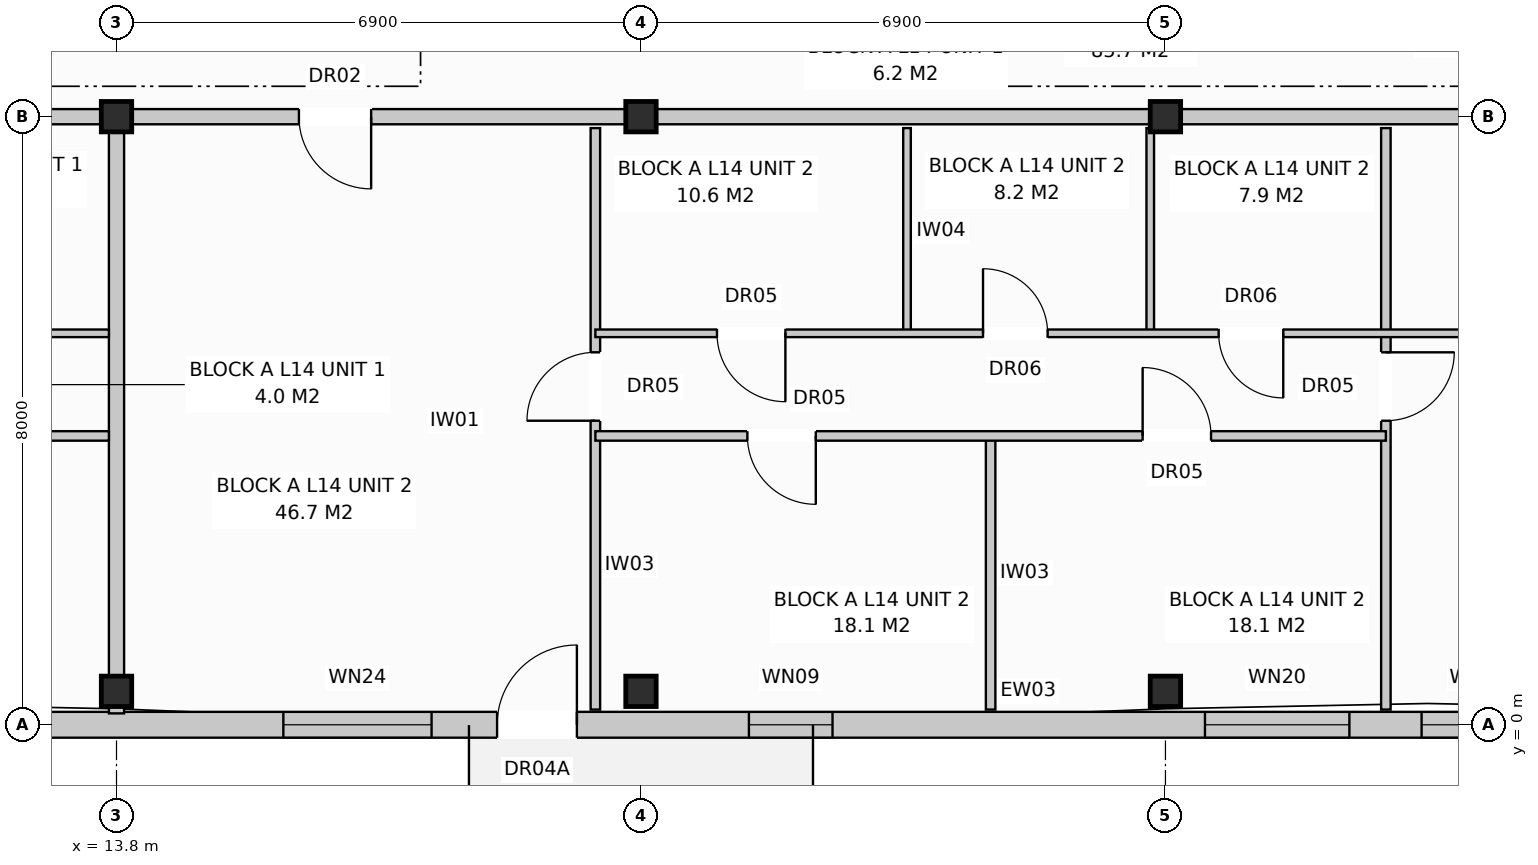
"""IFC4 building model, lengths in metres.
Left out: names, types, materials, properties, quantities, classifications, styles, units other than length and angle.
Written with IfcOpenShell. Run it as: python <this file> out.ifc"""

import sys

from ifc_helpers import new_model, si_unit, direction, frame, frame_2d, origin, origin_with_axes, origin_2d, place, context, subcontext, project, spatial, rectangle, extrude, element, fill, save


model = new_model("IFC4")
c1 = context("Model", 3, precision=1e-05, world=origin(), true_north=direction((0.0, 1.0)))
c2 = subcontext(c1, "Body", "Model", "MODEL_VIEW")
j1 = project(units=[si_unit("LENGTHUNIT", "METRE"), si_unit("PLANEANGLEUNIT", "RADIAN")], contexts=[c1])
p1 = place(None, origin())
s1 = spatial("IfcSite", under=j1, at=p1, CompositionType="ELEMENT")
p2 = place(p1, origin())
s2 = spatial("IfcBuilding", under=s1, at=p2, CompositionType="ELEMENT")
p3 = place(p2, frame((0.0, 0.0, 46.4)))
s3 = spatial("IfcBuildingStorey", under=s2, at=p3, CompositionType="ELEMENT", Elevation=46.4)
for number, where, z_axis, x_axis in (
    (1, (13.8, 0.44, 0.0), (0.0, 0.0, 1.0), (1.0, 0.0, 0.0)),
    (2, (13.8, 8.0, 0.0), (0.0, 0.0, 1.0), (1.0, 0.0, 0.0)),
    (3, (20.7, 0.44, 0.0), (0.0, 0.0, 1.0), (1.0, 0.0, 0.0)),
    (4, (20.7, 8.0, 0.0), (0.0, 0.0, 1.0), (1.0, 0.0, 0.0)),
    (5, (27.6, 0.44, 0.0), (0.0, 0.0, 1.0), (1.0, 0.0, 0.0)),
    (6, (27.6, 8.0, 0.0), (0.0, 0.0, 1.0), (1.0, 0.0, 0.0)),
):
    element("IfcColumn", number, at=place(p3, frame(where, z_axis=z_axis, x_axis=x_axis)), inside=s3, PredefinedType="COLUMN", context=c2, shape_type="SweptSolid", body=[
        extrude(rectangle(XDim=0.4, YDim=0.4, at=origin_2d()), origin(), (0.0, 0.0, 1.0), 3.2),
    ])
p4 = place(p3, frame((0.16, 0.0, 0.0), z_axis=(0.0, 0.0, 1.0), x_axis=(1.0, 0.0, 0.0)))
e7 = element("IfcWall", 7, at=p4, inside=s3, PredefinedType="STANDARD", context=c2, shape_type="SweptSolid", body=[
    extrude(rectangle(XDim=41.08, YDim=0.34, at=frame_2d((20.54, 0.0))), origin(), (0.0, 0.0, 1.0), 2.91),
])
p5 = place(p4, frame((7.36, 0.0, 0.0)))
e8 = element("IfcOpeningElement", 8, at=p5, cuts=e7, PredefinedType="OPENING", context=c2, shape_type="SweptSolid", body=[
    extrude(rectangle(XDim=1.05, YDim=2.12, at=frame_2d((0.525, 1.06))), frame((0.0, 0.182, 0.0), z_axis=(0.0, -1.0, 0.0), x_axis=(1.0, 0.0, 0.0)), (0.0, 0.0, 1.0), 0.364),
])
p6 = place(p4, frame((18.647, 0.0, 0.0)))
e9 = element("IfcOpeningElement", 9, at=p6, cuts=e7, PredefinedType="OPENING", context=c2, shape_type="SweptSolid", body=[
    extrude(rectangle(XDim=1.05, YDim=2.12, at=frame_2d((0.525, 1.06))), frame((0.0, 0.182, 0.0), z_axis=(0.0, -1.0, 0.0), x_axis=(1.0, 0.0, 0.0)), (0.0, 0.0, 1.0), 0.364),
])
p7 = place(p4, frame((32.647, 0.0, 0.0)))
e10 = element("IfcOpeningElement", 10, at=p7, cuts=e7, PredefinedType="OPENING", context=c2, shape_type="SweptSolid", body=[
    extrude(rectangle(XDim=1.05, YDim=2.12, at=frame_2d((0.525, 1.06))), frame((0.0, 0.182, 0.0), z_axis=(0.0, -1.0, 0.0), x_axis=(1.0, 0.0, 0.0)), (0.0, 0.0, 1.0), 0.364),
])
p8 = place(p4, frame((1.61, 0.0, 0.8)))
e11 = element("IfcOpeningElement", 11, at=p8, cuts=e7, PredefinedType="OPENING", context=c2, shape_type="SweptSolid", body=[
    extrude(rectangle(XDim=1.8, YDim=1.7, at=frame_2d((0.9, 0.85))), frame((0.0, 0.182, 0.0), z_axis=(0.0, -1.0, 0.0), x_axis=(1.0, 0.0, 0.0)), (0.0, 0.0, 1.0), 0.364),
])
p9 = place(p4, frame((10.46, 0.0, 0.8)))
e12 = element("IfcOpeningElement", 12, at=p9, cuts=e7, PredefinedType="OPENING", context=c2, shape_type="SweptSolid", body=[
    extrude(rectangle(XDim=1.9, YDim=1.85, at=frame_2d((0.95, 0.925))), frame((0.0, 0.182, 0.0), z_axis=(0.0, -1.0, 0.0), x_axis=(1.0, 0.0, 0.0)), (0.0, 0.0, 1.0), 0.364),
])
p10 = place(p4, frame((15.835, 0.0, 0.8)))
e13 = element("IfcOpeningElement", 13, at=p10, cuts=e7, PredefinedType="OPENING", context=c2, shape_type="SweptSolid", body=[
    extrude(rectangle(XDim=1.95, YDim=1.65, at=frame_2d((0.975, 0.825))), frame((0.0, 0.182, 0.0), z_axis=(0.0, -1.0, 0.0), x_axis=(1.0, 0.0, 0.0)), (0.0, 0.0, 1.0), 0.364),
])
p11 = place(p4, frame((21.96, 0.0, 0.72)))
e14 = element("IfcOpeningElement", 14, at=p11, cuts=e7, PredefinedType="OPENING", context=c2, shape_type="SweptSolid", body=[
    extrude(rectangle(XDim=1.1, YDim=1.5, at=frame_2d((0.55, 0.75))), frame((0.0, 0.182, 0.0), z_axis=(0.0, -1.0, 0.0), x_axis=(1.0, 0.0, 0.0)), (0.0, 0.0, 1.0), 0.364),
])
p12 = place(p4, frame((27.96, 0.0, 0.8)))
e15 = element("IfcOpeningElement", 15, at=p12, cuts=e7, PredefinedType="OPENING", context=c2, shape_type="SweptSolid", body=[
    extrude(rectangle(XDim=1.9, YDim=1.85, at=frame_2d((0.95, 0.925))), frame((0.0, 0.182, 0.0), z_axis=(0.0, -1.0, 0.0), x_axis=(1.0, 0.0, 0.0)), (0.0, 0.0, 1.0), 0.364),
])
p13 = place(p4, frame((30.81, 0.0, 0.85)))
e16 = element("IfcOpeningElement", 16, at=p13, cuts=e7, PredefinedType="OPENING", context=c2, shape_type="SweptSolid", body=[
    extrude(rectangle(XDim=1.5, YDim=1.65, at=frame_2d((0.75, 0.825))), frame((0.0, 0.182, 0.0), z_axis=(0.0, -1.0, 0.0), x_axis=(1.0, 0.0, 0.0)), (0.0, 0.0, 1.0), 0.364),
])
p14 = place(p4, frame((35.76, 0.0, 0.72)))
e17 = element("IfcOpeningElement", 17, at=p14, cuts=e7, PredefinedType="OPENING", context=c2, shape_type="SweptSolid", body=[
    extrude(rectangle(XDim=1.1, YDim=1.5, at=frame_2d((0.55, 0.75))), frame((0.0, 0.182, 0.0), z_axis=(0.0, -1.0, 0.0), x_axis=(1.0, 0.0, 0.0)), (0.0, 0.0, 1.0), 0.364),
])
p15 = place(p4, frame((38.575, 0.0, 0.8)))
e18 = element("IfcOpeningElement", 18, at=p15, cuts=e7, PredefinedType="OPENING", context=c2, shape_type="SweptSolid", body=[
    extrude(rectangle(XDim=1.9, YDim=1.85, at=frame_2d((0.95, 0.925))), frame((0.0, 0.182, 0.0), z_axis=(0.0, -1.0, 0.0), x_axis=(1.0, 0.0, 0.0)), (0.0, 0.0, 1.0), 0.364),
])
p16 = place(p3, frame((13.8, 7.85, 0.0), z_axis=(0.0, 0.0, 1.0), x_axis=(0.0, -1.0, 0.0)))
e19 = element("IfcWall", 19, at=p16, inside=s3, PredefinedType="PARTITIONING", context=c2, shape_type="SweptSolid", body=[
    extrude(rectangle(XDim=7.7, YDim=0.2, at=frame_2d((3.85, 0.0))), origin(), (0.0, 0.0, 1.0), 2.91),
])
p17 = place(p3, frame((0.0, 8.0, 0.0), z_axis=(0.0, 0.0, 1.0), x_axis=(1.0, 0.0, 0.0)))
e20 = element("IfcWall", 20, at=p17, inside=s3, PredefinedType="PARTITIONING", context=c2, shape_type="SweptSolid", body=[
    extrude(rectangle(XDim=13.8, YDim=0.2, at=frame_2d((6.9, 0.0))), origin(), (0.0, 0.0, 1.0), 2.35),
])
p18 = place(p17, frame((2.4, 0.0, 0.0)))
e21 = element("IfcOpeningElement", 21, at=p18, cuts=e20, PredefinedType="OPENING", context=c2, shape_type="SweptSolid", body=[
    extrude(rectangle(XDim=0.95, YDim=2.15, at=frame_2d((0.475, 1.075))), frame((0.0, 0.112, 0.0), z_axis=(0.0, -1.0, 0.0), x_axis=(1.0, 0.0, 0.0)), (0.0, 0.0, 1.0), 0.224),
])
p19 = place(p3, frame((5.2, 5.15, 0.0), z_axis=(0.0, 0.0, 1.0), x_axis=(1.0, 0.0, 0.0)))
e22 = element("IfcWall", 22, at=p19, inside=s3, PredefinedType="PARTITIONING", context=c2, shape_type="SweptSolid", body=[
    extrude(rectangle(XDim=8.5, YDim=0.1, at=frame_2d((4.25, 0.0))), origin(), (0.0, 0.0, 1.0), 2.91),
])
p20 = place(p19, frame((1.0, 0.0, 0.0)))
e23 = element("IfcOpeningElement", 23, at=p20, cuts=e22, PredefinedType="OPENING", context=c2, shape_type="SweptSolid", body=[
    extrude(rectangle(XDim=0.85, YDim=2.1, at=frame_2d((0.425, 1.05))), frame((0.0, 0.062, 0.0), z_axis=(0.0, -1.0, 0.0), x_axis=(1.0, 0.0, 0.0)), (0.0, 0.0, 1.0), 0.124),
])
p21 = place(p19, frame((3.4, 0.0, 0.0)))
e24 = element("IfcOpeningElement", 24, at=p21, cuts=e22, PredefinedType="OPENING", context=c2, shape_type="SweptSolid", body=[
    extrude(rectangle(XDim=0.85, YDim=2.05, at=frame_2d((0.425, 1.025))), frame((0.0, 0.062, 0.0), z_axis=(0.0, -1.0, 0.0), x_axis=(1.0, 0.0, 0.0)), (0.0, 0.0, 1.0), 0.124),
])
p22 = place(p19, frame((6.2, 0.0, 0.0)))
e25 = element("IfcOpeningElement", 25, at=p22, cuts=e22, PredefinedType="OPENING", context=c2, shape_type="SweptSolid", body=[
    extrude(rectangle(XDim=0.85, YDim=2.05, at=frame_2d((0.425, 1.025))), frame((0.0, 0.062, 0.0), z_axis=(0.0, -1.0, 0.0), x_axis=(1.0, 0.0, 0.0)), (0.0, 0.0, 1.0), 0.124),
])
p23 = place(p3, frame((5.2, 3.8, 0.0), z_axis=(0.0, 0.0, 1.0), x_axis=(1.0, 0.0, 0.0)))
e26 = element("IfcWall", 26, at=p23, inside=s3, PredefinedType="PARTITIONING", context=c2, shape_type="SweptSolid", body=[
    extrude(rectangle(XDim=8.5, YDim=0.125, at=frame_2d((4.25, 0.0))), origin(), (0.0, 0.0, 1.0), 2.91),
])
p24 = place(p23, frame((1.5, 0.0, 0.0)))
e27 = element("IfcOpeningElement", 27, at=p24, cuts=e26, PredefinedType="OPENING", context=c2, shape_type="SweptSolid", body=[
    extrude(rectangle(XDim=0.9, YDim=2.1, at=frame_2d((0.45, 1.05))), frame((0.0, 0.074, 0.0), z_axis=(0.0, -1.0, 0.0), x_axis=(1.0, 0.0, 0.0)), (0.0, 0.0, 1.0), 0.149),
])
p25 = place(p23, frame((5.6, 0.0, 0.0)))
e28 = element("IfcOpeningElement", 28, at=p25, cuts=e26, PredefinedType="OPENING", context=c2, shape_type="SweptSolid", body=[
    extrude(rectangle(XDim=0.9, YDim=2.1, at=frame_2d((0.45, 1.05))), frame((0.0, 0.074, 0.0), z_axis=(0.0, -1.0, 0.0), x_axis=(1.0, 0.0, 0.0)), (0.0, 0.0, 1.0), 0.149),
])
p26 = place(p3, frame((13.8, 8.0, 0.0), z_axis=(0.0, 0.0, 1.0), x_axis=(1.0, 0.0, 0.0)))
e29 = element("IfcWall", 29, at=p26, inside=s3, PredefinedType="PARTITIONING", context=c2, shape_type="SweptSolid", body=[
    extrude(rectangle(XDim=20.7, YDim=0.2, at=frame_2d((10.35, 0.0))), origin(), (0.0, 0.0, 1.0), 2.35),
])
p27 = place(p26, frame((2.4, 0.0, 0.0)))
e30 = element("IfcOpeningElement", 30, at=p27, cuts=e29, PredefinedType="OPENING", context=c2, shape_type="SweptSolid", body=[
    extrude(rectangle(XDim=0.95, YDim=2.15, at=frame_2d((0.475, 1.075))), frame((0.0, 0.112, 0.0), z_axis=(0.0, -1.0, 0.0), x_axis=(1.0, 0.0, 0.0)), (0.0, 0.0, 1.0), 0.224),
])
p28 = place(p3, frame((20.1, 7.85, 0.0), z_axis=(0.0, 0.0, 1.0), x_axis=(0.0, -1.0, 0.0)))
e31 = element("IfcWall", 31, at=p28, inside=s3, PredefinedType="PARTITIONING", context=c2, shape_type="SweptSolid", body=[
    extrude(rectangle(XDim=7.65, YDim=0.125, at=frame_2d((3.825, 0.0))), origin(), (0.0, 0.0, 1.0), 2.91),
])
p29 = place(p28, frame((2.95, 0.0, 0.0)))
e32 = element("IfcOpeningElement", 32, at=p29, cuts=e31, PredefinedType="OPENING", context=c2, shape_type="SweptSolid", body=[
    extrude(rectangle(XDim=0.9, YDim=2.1, at=frame_2d((0.45, 1.05))), frame((0.0, 0.074, 0.0), z_axis=(0.0, -1.0, 0.0), x_axis=(1.0, 0.0, 0.0)), (0.0, 0.0, 1.0), 0.149),
])
for number, where, z_axis, x_axis in (
    (33, (24.2, 7.85, 0.0), (0.0, 0.0, 1.0), (0.0, -1.0, 0.0)),
    (34, (27.4, 7.85, 0.0), (0.0, 0.0, 1.0), (0.0, -1.0, 0.0)),
):
    element("IfcWall", number, at=place(p3, frame(where, z_axis=z_axis, x_axis=x_axis)), inside=s3, PredefinedType="PARTITIONING", context=c2, shape_type="SweptSolid", body=[
        extrude(rectangle(XDim=2.7, YDim=0.1, at=frame_2d((1.35, 0.0))), origin(), (0.0, 0.0, 1.0), 2.91),
    ])
p30 = place(p3, frame((25.3, 3.8, 0.0), z_axis=(0.0, 0.0, 1.0), x_axis=(0.0, -1.0, 0.0)))
e35 = element("IfcWall", 35, at=p30, inside=s3, PredefinedType="PARTITIONING", context=c2, shape_type="SweptSolid", body=[
    extrude(rectangle(XDim=3.6, YDim=0.125, at=frame_2d((1.8, 0.0))), origin(), (0.0, 0.0, 1.0), 2.91),
])
p31 = place(p3, frame((30.5, 7.85, 0.0), z_axis=(0.0, 0.0, 1.0), x_axis=(0.0, -1.0, 0.0)))
e36 = element("IfcWall", 36, at=p31, inside=s3, PredefinedType="PARTITIONING", context=c2, shape_type="SweptSolid", body=[
    extrude(rectangle(XDim=7.65, YDim=0.125, at=frame_2d((3.825, 0.0))), origin(), (0.0, 0.0, 1.0), 2.91),
])
p32 = place(p31, frame((2.95, 0.0, 0.0)))
e37 = element("IfcOpeningElement", 37, at=p32, cuts=e36, PredefinedType="OPENING", context=c2, shape_type="SweptSolid", body=[
    extrude(rectangle(XDim=0.9, YDim=2.1, at=frame_2d((0.45, 1.05))), frame((0.0, 0.074, 0.0), z_axis=(0.0, -1.0, 0.0), x_axis=(1.0, 0.0, 0.0)), (0.0, 0.0, 1.0), 0.149),
])
p33 = place(p3, frame((20.1, 5.15, 0.0), z_axis=(0.0, 0.0, 1.0), x_axis=(1.0, 0.0, 0.0)))
e38 = element("IfcWall", 38, at=p33, inside=s3, PredefinedType="PARTITIONING", context=c2, shape_type="SweptSolid", body=[
    extrude(rectangle(XDim=14.3, YDim=0.1, at=frame_2d((7.15, 0.0))), origin(), (0.0, 0.0, 1.0), 2.91),
])
p34 = place(p33, frame((1.6, 0.0, 0.0)))
e39 = element("IfcOpeningElement", 39, at=p34, cuts=e38, PredefinedType="OPENING", context=c2, shape_type="SweptSolid", body=[
    extrude(rectangle(XDim=0.9, YDim=2.1, at=frame_2d((0.45, 1.05))), frame((0.0, 0.062, 0.0), z_axis=(0.0, -1.0, 0.0), x_axis=(1.0, 0.0, 0.0)), (0.0, 0.0, 1.0), 0.124),
])
p35 = place(p33, frame((5.1, 0.0, 0.0)))
e40 = element("IfcOpeningElement", 40, at=p35, cuts=e38, PredefinedType="OPENING", context=c2, shape_type="SweptSolid", body=[
    extrude(rectangle(XDim=0.85, YDim=2.05, at=frame_2d((0.425, 1.025))), frame((0.0, 0.062, 0.0), z_axis=(0.0, -1.0, 0.0), x_axis=(1.0, 0.0, 0.0)), (0.0, 0.0, 1.0), 0.124),
])
p36 = place(p33, frame((8.2, 0.0, 0.0)))
e41 = element("IfcOpeningElement", 41, at=p36, cuts=e38, PredefinedType="OPENING", context=c2, shape_type="SweptSolid", body=[
    extrude(rectangle(XDim=0.85, YDim=2.05, at=frame_2d((0.425, 1.025))), frame((0.0, 0.062, 0.0), z_axis=(0.0, -1.0, 0.0), x_axis=(1.0, 0.0, 0.0)), (0.0, 0.0, 1.0), 0.124),
])
p37 = place(p33, frame((11.6, 0.0, 0.0)))
e42 = element("IfcOpeningElement", 42, at=p37, cuts=e38, PredefinedType="OPENING", context=c2, shape_type="SweptSolid", body=[
    extrude(rectangle(XDim=0.85, YDim=2.05, at=frame_2d((0.425, 1.025))), frame((0.0, 0.062, 0.0), z_axis=(0.0, -1.0, 0.0), x_axis=(1.0, 0.0, 0.0)), (0.0, 0.0, 1.0), 0.124),
])
p38 = place(p3, frame((20.1, 3.8, 0.0), z_axis=(0.0, 0.0, 1.0), x_axis=(1.0, 0.0, 0.0)))
e43 = element("IfcWall", 43, at=p38, inside=s3, PredefinedType="PARTITIONING", context=c2, shape_type="SweptSolid", body=[
    extrude(rectangle(XDim=10.4, YDim=0.125, at=frame_2d((5.2, 0.0))), origin(), (0.0, 0.0, 1.0), 2.91),
])
p39 = place(p38, frame((2.0, 0.0, 0.0)))
e44 = element("IfcOpeningElement", 44, at=p39, cuts=e43, PredefinedType="OPENING", context=c2, shape_type="SweptSolid", body=[
    extrude(rectangle(XDim=0.9, YDim=2.1, at=frame_2d((0.45, 1.05))), frame((0.0, 0.074, 0.0), z_axis=(0.0, -1.0, 0.0), x_axis=(1.0, 0.0, 0.0)), (0.0, 0.0, 1.0), 0.149),
])
p40 = place(p38, frame((7.2, 0.0, 0.0)))
e45 = element("IfcOpeningElement", 45, at=p40, cuts=e43, PredefinedType="OPENING", context=c2, shape_type="SweptSolid", body=[
    extrude(rectangle(XDim=0.9, YDim=2.1, at=frame_2d((0.45, 1.05))), frame((0.0, 0.074, 0.0), z_axis=(0.0, -1.0, 0.0), x_axis=(1.0, 0.0, 0.0)), (0.0, 0.0, 1.0), 0.149),
])
p41 = place(p6, origin_with_axes())
e46 = element("IfcDoor", 46, at=p41, inside=s3, OperationType="SINGLE_SWING_RIGHT", PredefinedType="DOOR", context=c2, shape_type="SweptSolid", body=[
    extrude(rectangle(XDim=1.05, YDim=2.12, at=frame_2d((0.525, 1.06))), frame((0.0, 0.025, 0.0), z_axis=(0.0, -1.0, 0.0), x_axis=(1.0, 0.0, 0.0)), (0.0, 0.0, 1.0), 0.05),
])
fill(e9, e46)
p42 = place(p10, origin_with_axes())
e47 = element("IfcWindow", 47, at=p42, inside=s3, PartitioningType="SINGLE_PANEL", PredefinedType="WINDOW", context=c2, shape_type="SweptSolid", body=[
    extrude(rectangle(XDim=1.95, YDim=1.65, at=frame_2d((0.975, 0.825))), frame((0.0, 0.03, 0.0), z_axis=(0.0, -1.0, 0.0), x_axis=(1.0, 0.0, 0.0)), (0.0, 0.0, 1.0), 0.06),
])
fill(e13, e47)
p43 = place(p11, origin_with_axes())
e48 = element("IfcWindow", 48, at=p43, inside=s3, PartitioningType="SINGLE_PANEL", PredefinedType="WINDOW", context=c2, shape_type="SweptSolid", body=[
    extrude(rectangle(XDim=1.1, YDim=1.5, at=frame_2d((0.55, 0.75))), frame((0.0, 0.03, 0.0), z_axis=(0.0, -1.0, 0.0), x_axis=(1.0, 0.0, 0.0)), (0.0, 0.0, 1.0), 0.06),
])
fill(e14, e48)
p44 = place(p12, origin_with_axes())
e49 = element("IfcWindow", 49, at=p44, inside=s3, PartitioningType="SINGLE_PANEL", PredefinedType="WINDOW", context=c2, shape_type="SweptSolid", body=[
    extrude(rectangle(XDim=1.9, YDim=1.85, at=frame_2d((0.95, 0.925))), frame((0.0, 0.03, 0.0), z_axis=(0.0, -1.0, 0.0), x_axis=(1.0, 0.0, 0.0)), (0.0, 0.0, 1.0), 0.06),
])
fill(e15, e49)
p45 = place(p13, origin_with_axes())
e50 = element("IfcWindow", 50, at=p45, inside=s3, PartitioningType="SINGLE_PANEL", PredefinedType="WINDOW", context=c2, shape_type="SweptSolid", body=[
    extrude(rectangle(XDim=1.5, YDim=1.65, at=frame_2d((0.75, 0.825))), frame((0.0, 0.03, 0.0), z_axis=(0.0, -1.0, 0.0), x_axis=(1.0, 0.0, 0.0)), (0.0, 0.0, 1.0), 0.06),
])
fill(e16, e50)
p46 = place(p27, frame((0.95, 0.0, 0.0), z_axis=(0.0, 0.0, 1.0), x_axis=(-1.0, 0.0, 0.0)))
e51 = element("IfcDoor", 51, at=p46, inside=s3, OperationType="SINGLE_SWING_RIGHT", PredefinedType="DOOR", context=c2, shape_type="SweptSolid", body=[
    extrude(rectangle(XDim=0.95, YDim=2.15, at=frame_2d((0.475, 1.075))), frame((0.0, 0.025, 0.0), z_axis=(0.0, -1.0, 0.0), x_axis=(1.0, 0.0, 0.0)), (0.0, 0.0, 1.0), 0.05),
])
fill(e30, e51)
p47 = place(p29, frame((0.9, 0.0, 0.0), z_axis=(0.0, 0.0, 1.0), x_axis=(-1.0, 0.0, 0.0)))
e52 = element("IfcDoor", 52, at=p47, inside=s3, OperationType="SINGLE_SWING_RIGHT", PredefinedType="DOOR", context=c2, shape_type="SweptSolid", body=[
    extrude(rectangle(XDim=0.9, YDim=2.1, at=frame_2d((0.45, 1.05))), frame((0.0, 0.025, 0.0), z_axis=(0.0, -1.0, 0.0), x_axis=(1.0, 0.0, 0.0)), (0.0, 0.0, 1.0), 0.05),
])
fill(e32, e52)
p48 = place(p32, origin_with_axes())
e53 = element("IfcDoor", 53, at=p48, inside=s3, OperationType="SINGLE_SWING_LEFT", PredefinedType="DOOR", context=c2, shape_type="SweptSolid", body=[
    extrude(rectangle(XDim=0.9, YDim=2.1, at=frame_2d((0.45, 1.05))), frame((0.0, 0.025, 0.0), z_axis=(0.0, -1.0, 0.0), x_axis=(1.0, 0.0, 0.0)), (0.0, 0.0, 1.0), 0.05),
])
fill(e37, e53)
p49 = place(p34, frame((0.9, 0.0, 0.0), z_axis=(0.0, 0.0, 1.0), x_axis=(-1.0, 0.0, 0.0)))
e54 = element("IfcDoor", 54, at=p49, inside=s3, OperationType="SINGLE_SWING_RIGHT", PredefinedType="DOOR", context=c2, shape_type="SweptSolid", body=[
    extrude(rectangle(XDim=0.9, YDim=2.1, at=frame_2d((0.45, 1.05))), frame((0.0, 0.025, 0.0), z_axis=(0.0, -1.0, 0.0), x_axis=(1.0, 0.0, 0.0)), (0.0, 0.0, 1.0), 0.05),
])
fill(e39, e54)
p50 = place(p35, origin_with_axes())
e55 = element("IfcDoor", 55, at=p50, inside=s3, OperationType="SINGLE_SWING_LEFT", PredefinedType="DOOR", context=c2, shape_type="SweptSolid", body=[
    extrude(rectangle(XDim=0.85, YDim=2.05, at=frame_2d((0.425, 1.025))), frame((0.0, 0.025, 0.0), z_axis=(0.0, -1.0, 0.0), x_axis=(1.0, 0.0, 0.0)), (0.0, 0.0, 1.0), 0.05),
])
fill(e40, e55)
p51 = place(p36, frame((0.85, 0.0, 0.0), z_axis=(0.0, 0.0, 1.0), x_axis=(-1.0, 0.0, 0.0)))
e56 = element("IfcDoor", 56, at=p51, inside=s3, OperationType="SINGLE_SWING_RIGHT", PredefinedType="DOOR", context=c2, shape_type="SweptSolid", body=[
    extrude(rectangle(XDim=0.85, YDim=2.05, at=frame_2d((0.425, 1.025))), frame((0.0, 0.025, 0.0), z_axis=(0.0, -1.0, 0.0), x_axis=(1.0, 0.0, 0.0)), (0.0, 0.0, 1.0), 0.05),
])
fill(e41, e56)
p52 = place(p39, frame((0.9, 0.0, 0.0), z_axis=(0.0, 0.0, 1.0), x_axis=(-1.0, 0.0, 0.0)))
e57 = element("IfcDoor", 57, at=p52, inside=s3, OperationType="SINGLE_SWING_RIGHT", PredefinedType="DOOR", context=c2, shape_type="SweptSolid", body=[
    extrude(rectangle(XDim=0.9, YDim=2.1, at=frame_2d((0.45, 1.05))), frame((0.0, 0.025, 0.0), z_axis=(0.0, -1.0, 0.0), x_axis=(1.0, 0.0, 0.0)), (0.0, 0.0, 1.0), 0.05),
])
fill(e44, e57)
p53 = place(p40, origin_with_axes())
e58 = element("IfcDoor", 58, at=p53, inside=s3, OperationType="SINGLE_SWING_LEFT", PredefinedType="DOOR", context=c2, shape_type="SweptSolid", body=[
    extrude(rectangle(XDim=0.9, YDim=2.1, at=frame_2d((0.45, 1.05))), frame((0.0, 0.025, 0.0), z_axis=(0.0, -1.0, 0.0), x_axis=(1.0, 0.0, 0.0)), (0.0, 0.0, 1.0), 0.05),
])
fill(e45, e58)
save(model, sys.argv[1])
